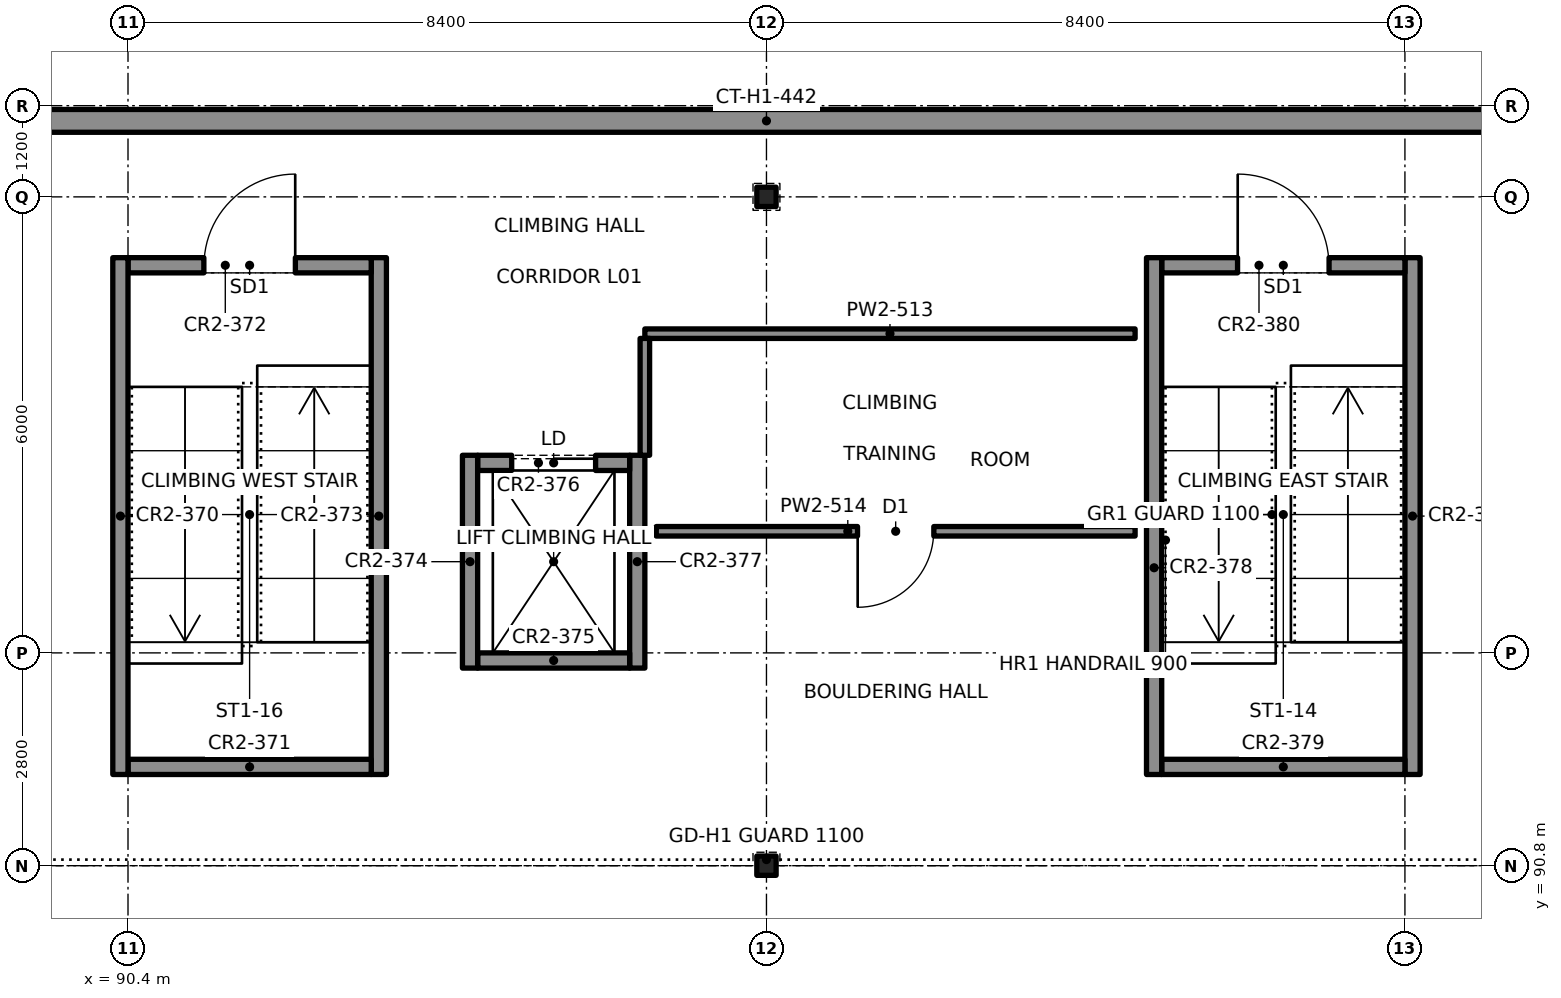
"""IFC4 building model, lengths in metres.
Left out: names, types, materials, properties, quantities, classifications, styles, units other than length and angle.
Written with IfcOpenShell. Run it as: python <this file> out.ifc"""

import sys

from ifc_helpers import new_model, si_unit, direction, frame, frame_2d, origin, origin_2d, place, context, subcontext, project, spatial, rectangle, hollow_rectangle, extrude, element, fill, save


model = new_model("IFC4")
c1 = context("Model", 3, precision=1e-05, world=origin(), true_north=direction((0.0, 1.0)))
c2 = subcontext(c1, "Body", "Model", "MODEL_VIEW")
j1 = project(units=[si_unit("LENGTHUNIT", "METRE"), si_unit("PLANEANGLEUNIT", "RADIAN")], contexts=[c1])
p1 = place(None, origin())
s1 = spatial("IfcSite", under=j1, at=p1, CompositionType="ELEMENT")
p2 = place(p1, origin())
s2 = spatial("IfcBuilding", under=s1, at=p2, CompositionType="ELEMENT")
p3 = place(p2, frame((0.0, 0.0, 4.4)))
s3 = spatial("IfcBuildingStorey", under=s2, at=p3, CompositionType="ELEMENT", Elevation=4.4)
for number, where, z_axis, x_axis in (
    (1, (98.8, 90.8, 0.0), (0.0, 0.0, 1.0), (1.0, 0.0, 0.0)),
    (2, (98.8, 99.6, 0.0), (0.0, 0.0, 1.0), (1.0, 0.0, 0.0)),
):
    element("IfcColumn", number, at=place(p3, frame(where, z_axis=z_axis, x_axis=x_axis)), inside=s3, PredefinedType="COLUMN", context=c2, shape_type="SweptSolid", body=[
        extrude(hollow_rectangle(XDim=0.254, YDim=0.254, WallThickness=0.013, at=origin_2d()), origin(), (0.0, 0.0, 1.0), 4.4),
    ])
p4 = place(p3, frame((88.0, 100.6, 0.0), z_axis=(0.0, 0.0, 1.0), x_axis=(1.0, 0.0, 0.0)))
e3 = element("IfcWall", 3, at=p4, inside=s3, PredefinedType="SOLIDWALL", context=c2, shape_type="SweptSolid", body=[
    extrude(rectangle(XDim=21.6, YDim=0.3, at=frame_2d((10.8, 0.0))), origin(), (0.0, 0.0, 1.0), 4.4),
])
for number, where, z_axis, x_axis in (
    (4, (103.9, 92.0, 0.0), (0.0, 0.0, 1.0), (0.0, 1.0, 0.0)),
    (5, (107.3, 92.0, 0.0), (0.0, 0.0, 1.0), (0.0, 1.0, 0.0)),
):
    element("IfcWall", number, at=place(p3, frame(where, z_axis=z_axis, x_axis=x_axis)), inside=s3, PredefinedType="SOLIDWALL", context=c2, shape_type="SweptSolid", body=[
        extrude(rectangle(XDim=6.8, YDim=0.2, at=frame_2d((3.4, 0.0))), origin(), (0.0, 0.0, 1.0), 4.4),
    ])
p5 = place(p3, frame((104.0, 92.1, 0.0), z_axis=(0.0, 0.0, 1.0), x_axis=(1.0, 0.0, 0.0)))
e6 = element("IfcWall", 6, at=p5, inside=s3, PredefinedType="SOLIDWALL", context=c2, shape_type="SweptSolid", body=[
    extrude(rectangle(XDim=3.2, YDim=0.2, at=frame_2d((1.6, 0.0))), origin(), (0.0, 0.0, 1.0), 4.4),
])
p6 = place(p3, frame((104.0, 98.7, 0.0), z_axis=(0.0, 0.0, 1.0), x_axis=(1.0, 0.0, 0.0)))
e7 = element("IfcWall", 7, at=p6, inside=s3, PredefinedType="SOLIDWALL", context=c2, shape_type="SweptSolid", body=[
    extrude(rectangle(XDim=3.2, YDim=0.2, at=frame_2d((1.6, 0.0))), origin(), (0.0, 0.0, 1.0), 4.4),
])
p7 = place(p6, frame((1.0, 0.0, 0.0)))
e8 = element("IfcOpeningElement", 8, at=p7, cuts=e7, PredefinedType="OPENING", context=c2, shape_type="SweptSolid", body=[
    extrude(rectangle(XDim=1.2, YDim=2.1, at=frame_2d((0.6, 1.05))), frame((0.0, 0.11, 0.0), z_axis=(0.0, -1.0, 0.0), x_axis=(1.0, 0.0, 0.0)), (0.0, 0.0, 1.0), 0.22),
])
for number, where, z_axis, x_axis in (
    (9, (90.3, 92.0, 0.0), (0.0, 0.0, 1.0), (0.0, 1.0, 0.0)),
    (10, (93.7, 92.0, 0.0), (0.0, 0.0, 1.0), (0.0, 1.0, 0.0)),
):
    element("IfcWall", number, at=place(p3, frame(where, z_axis=z_axis, x_axis=x_axis)), inside=s3, PredefinedType="SOLIDWALL", context=c2, shape_type="SweptSolid", body=[
        extrude(rectangle(XDim=6.8, YDim=0.2, at=frame_2d((3.4, 0.0))), origin(), (0.0, 0.0, 1.0), 4.4),
    ])
p8 = place(p3, frame((90.4, 92.1, 0.0), z_axis=(0.0, 0.0, 1.0), x_axis=(1.0, 0.0, 0.0)))
e11 = element("IfcWall", 11, at=p8, inside=s3, PredefinedType="SOLIDWALL", context=c2, shape_type="SweptSolid", body=[
    extrude(rectangle(XDim=3.2, YDim=0.2, at=frame_2d((1.6, 0.0))), origin(), (0.0, 0.0, 1.0), 4.4),
])
p9 = place(p3, frame((90.4, 98.7, 0.0), z_axis=(0.0, 0.0, 1.0), x_axis=(1.0, 0.0, 0.0)))
e12 = element("IfcWall", 12, at=p9, inside=s3, PredefinedType="SOLIDWALL", context=c2, shape_type="SweptSolid", body=[
    extrude(rectangle(XDim=3.2, YDim=0.2, at=frame_2d((1.6, 0.0))), origin(), (0.0, 0.0, 1.0), 4.4),
])
p10 = place(p9, frame((1.0, 0.0, 0.0)))
e13 = element("IfcOpeningElement", 13, at=p10, cuts=e12, PredefinedType="OPENING", context=c2, shape_type="SweptSolid", body=[
    extrude(rectangle(XDim=1.2, YDim=2.1, at=frame_2d((0.6, 1.05))), frame((0.0, 0.11, 0.0), z_axis=(0.0, -1.0, 0.0), x_axis=(1.0, 0.0, 0.0)), (0.0, 0.0, 1.0), 0.22),
])
for number, where, z_axis, x_axis in (
    (14, (94.9, 93.4, 0.0), (0.0, 0.0, 1.0), (0.0, 1.0, 0.0)),
    (15, (97.1, 93.4, 0.0), (0.0, 0.0, 1.0), (0.0, 1.0, 0.0)),
):
    element("IfcWall", number, at=place(p3, frame(where, z_axis=z_axis, x_axis=x_axis)), inside=s3, PredefinedType="SOLIDWALL", context=c2, shape_type="SweptSolid", body=[
        extrude(rectangle(XDim=2.8, YDim=0.2, at=frame_2d((1.4, 0.0))), origin(), (0.0, 0.0, 1.0), 4.4),
    ])
p11 = place(p3, frame((95.0, 93.5, 0.0), z_axis=(0.0, 0.0, 1.0), x_axis=(1.0, 0.0, 0.0)))
e16 = element("IfcWall", 16, at=p11, inside=s3, PredefinedType="SOLIDWALL", context=c2, shape_type="SweptSolid", body=[
    extrude(rectangle(XDim=2.0, YDim=0.2, at=frame_2d((1.0, 0.0))), origin(), (0.0, 0.0, 1.0), 4.4),
])
p12 = place(p3, frame((95.0, 96.1, 0.0), z_axis=(0.0, 0.0, 1.0), x_axis=(1.0, 0.0, 0.0)))
e17 = element("IfcWall", 17, at=p12, inside=s3, PredefinedType="SOLIDWALL", context=c2, shape_type="SweptSolid", body=[
    extrude(rectangle(XDim=2.0, YDim=0.2, at=frame_2d((1.0, 0.0))), origin(), (0.0, 0.0, 1.0), 4.4),
])
p13 = place(p12, frame((0.45, 0.0, 0.0)))
e18 = element("IfcOpeningElement", 18, at=p13, cuts=e17, PredefinedType="OPENING", context=c2, shape_type="SweptSolid", body=[
    extrude(rectangle(XDim=1.1, YDim=2.1, at=frame_2d((0.55, 1.05))), frame((0.0, 0.11, 0.0), z_axis=(0.0, -1.0, 0.0), x_axis=(1.0, 0.0, 0.0)), (0.0, 0.0, 1.0), 0.22),
])
p14 = place(p3, frame((97.35, 95.2, 0.0), z_axis=(0.0, 0.0, 1.0), x_axis=(1.0, 0.0, 0.0)))
e19 = element("IfcWall", 19, at=p14, inside=s3, PredefinedType="PARTITIONING", context=c2, shape_type="SweptSolid", body=[
    extrude(rectangle(XDim=6.3, YDim=0.125, at=frame_2d((3.15, 0.0))), origin(), (0.0, 0.0, 1.0), 3.65),
])
p15 = place(p14, frame((2.65, 0.0, 0.0)))
e20 = element("IfcOpeningElement", 20, at=p15, cuts=e19, PredefinedType="OPENING", context=c2, shape_type="SweptSolid", body=[
    extrude(rectangle(XDim=1.0, YDim=2.1, at=frame_2d((0.5, 1.05))), frame((0.0, 0.073, 0.0), z_axis=(0.0, -1.0, 0.0), x_axis=(1.0, 0.0, 0.0)), (0.0, 0.0, 1.0), 0.145),
])
p16 = place(p3, frame((97.2, 97.8, 0.0), z_axis=(0.0, 0.0, 1.0), x_axis=(1.0, 0.0, 0.0)))
e21 = element("IfcWall", 21, at=p16, inside=s3, PredefinedType="PARTITIONING", context=c2, shape_type="SweptSolid", body=[
    extrude(rectangle(XDim=6.45, YDim=0.125, at=frame_2d((3.225, 0.0))), origin(), (0.0, 0.0, 1.0), 3.65),
])
p17 = place(p3, frame((97.2, 96.2, 0.0), z_axis=(0.0, 0.0, 1.0), x_axis=(0.0, 1.0, 0.0)))
e22 = element("IfcWall", 22, at=p17, inside=s3, PredefinedType="PARTITIONING", context=c2, shape_type="SweptSolid", body=[
    extrude(rectangle(XDim=1.538, YDim=0.125, at=frame_2d((0.769, 0.0))), origin(), (0.0, 0.0, 1.0), 3.65),
])
p18 = place(p7, origin())
e23 = element("IfcDoor", 23, at=p18, inside=s3, OperationType="SINGLE_SWING_LEFT", PredefinedType="DOOR", context=c2, shape_type="SweptSolid", body=[
    extrude(rectangle(XDim=1.2, YDim=2.1, at=frame_2d((0.6, 1.05))), frame((0.0, 0.025, 0.0), z_axis=(0.0, -1.0, 0.0), x_axis=(1.0, 0.0, 0.0)), (0.0, 0.0, 1.0), 0.05),
])
fill(e8, e23)
p19 = place(p10, origin())
e24 = element("IfcDoor", 24, at=p19, inside=s3, OperationType="SINGLE_SWING_RIGHT", PredefinedType="DOOR", context=c2, shape_type="SweptSolid", body=[
    extrude(rectangle(XDim=1.2, YDim=2.1, at=frame_2d((0.6, 1.05))), frame((0.0, 0.025, 0.0), z_axis=(0.0, -1.0, 0.0), x_axis=(1.0, 0.0, 0.0)), (0.0, 0.0, 1.0), 0.05),
])
fill(e13, e24)
p20 = place(p13, origin())
e25 = element("IfcDoor", 25, at=p20, inside=s3, OperationType="SLIDING_TO_LEFT", PredefinedType="DOOR", context=c2, shape_type="SweptSolid", body=[
    extrude(rectangle(XDim=1.1, YDim=2.1, at=frame_2d((0.55, 1.05))), frame((0.0, 0.025, 0.0), z_axis=(0.0, -1.0, 0.0), x_axis=(1.0, 0.0, 0.0)), (0.0, 0.0, 1.0), 0.05),
])
fill(e18, e25)
p21 = place(p15, origin())
e26 = element("IfcDoor", 26, at=p21, inside=s3, OperationType="SINGLE_SWING_LEFT", PredefinedType="DOOR", context=c2, shape_type="SweptSolid", body=[
    extrude(rectangle(XDim=1.0, YDim=2.1, at=frame_2d((0.5, 1.05))), frame((0.0, 0.025, 0.0), z_axis=(0.0, -1.0, 0.0), x_axis=(1.0, 0.0, 0.0)), (0.0, 0.0, 1.0), 0.05),
])
fill(e20, e26)
save(model, sys.argv[1])
